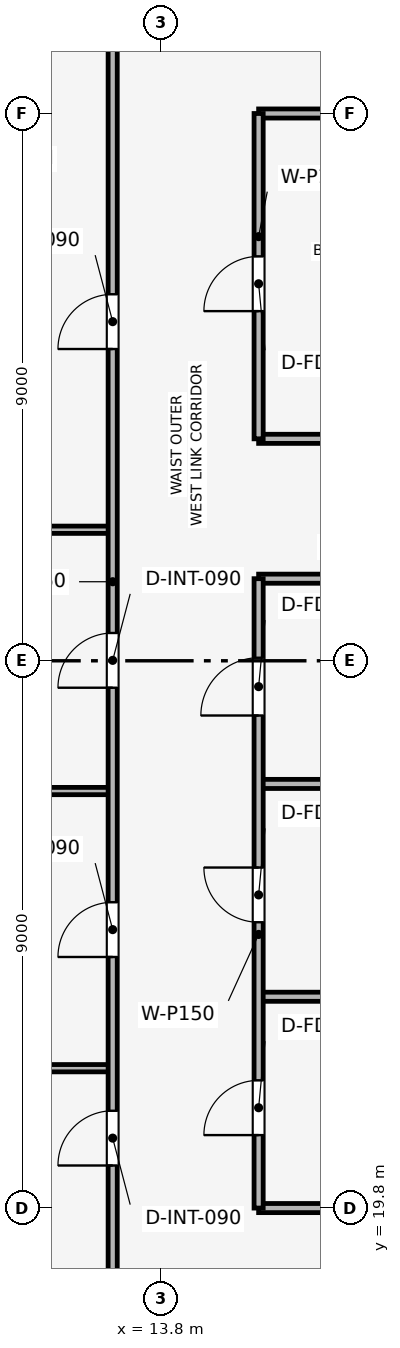
"""IFC4 building model, lengths in metres.
Left out: names, types, materials, properties, quantities, classifications, styles, units other than length and angle.
Written with IfcOpenShell. Run it as: python <this file> out.ifc"""

import sys

from ifc_helpers import new_model, si_unit, direction, frame, frame_2d, origin, place, context, subcontext, project, spatial, rectangle, extrude, element, fill, save


model = new_model("IFC4")
c1 = context("Model", 3, precision=1e-05, world=origin(), true_north=direction((0.0, 1.0)))
c2 = subcontext(c1, "Body", "Model", "MODEL_VIEW")
j1 = project(units=[si_unit("LENGTHUNIT", "METRE"), si_unit("PLANEANGLEUNIT", "RADIAN")], contexts=[c1])
p1 = place(None, origin())
s1 = spatial("IfcSite", under=j1, at=p1, CompositionType="ELEMENT")
p2 = place(p1, origin())
s2 = spatial("IfcBuilding", under=s1, at=p2, CompositionType="ELEMENT")
p3 = place(p2, frame((0.0, 0.0, 199.95)))
s3 = spatial("IfcBuildingStorey", under=s2, at=p3, CompositionType="ELEMENT", Elevation=199.95)
p4 = place(p3, frame((15.4, 19.8, 0.0), z_axis=(0.0, 0.0, 1.0), x_axis=(1.0, 0.0, 0.0)))
e1 = element("IfcWall", 1, at=p4, inside=s3, PredefinedType="PARTITIONING", context=c2, shape_type="SweptSolid", body=[
    extrude(rectangle(XDim=4.4, YDim=0.15, at=frame_2d((2.2, 0.0))), origin(), (0.0, 0.0, 1.0), 3.035),
])
for number, where, z_axis, x_axis in (
    (2, (15.4, 23.275, 0.0), (0.0, 0.0, 1.0), (1.0, 0.0, 0.0)),
    (3, (15.4, 26.775, 0.0), (0.0, 0.0, 1.0), (1.0, 0.0, 0.0)),
    (4, (15.4, 30.15, 0.0), (0.0, 0.0, 1.0), (1.0, 0.0, 0.0)),
    (5, (15.4, 32.45, 0.0), (0.0, 0.0, 1.0), (1.0, 0.0, 0.0)),
):
    element("IfcWall", number, at=place(p3, frame(where, z_axis=z_axis, x_axis=x_axis)), inside=s3, PredefinedType="PARTITIONING", context=c2, shape_type="SweptSolid", body=[
        extrude(rectangle(XDim=4.4, YDim=0.15, at=frame_2d((2.2, 0.0))), origin(), (0.0, 0.0, 1.0), 3.5),
    ])
p5 = place(p3, frame((15.4, 37.8, 0.0), z_axis=(0.0, 0.0, 1.0), x_axis=(1.0, 0.0, 0.0)))
e6 = element("IfcWall", 6, at=p5, inside=s3, PredefinedType="PARTITIONING", context=c2, shape_type="SweptSolid", body=[
    extrude(rectangle(XDim=4.4, YDim=0.15, at=frame_2d((2.2, 0.0))), origin(), (0.0, 0.0, 1.0), 3.035),
])
p6 = place(p3, frame((15.4, 19.8, 0.0), z_axis=(0.0, 0.0, 1.0), x_axis=(0.0, 1.0, 0.0)))
e7 = element("IfcWall", 7, at=p6, inside=s3, PredefinedType="PARTITIONING", context=c2, shape_type="SweptSolid", body=[
    extrude(rectangle(XDim=10.35, YDim=0.15, at=frame_2d((5.175, 0.0))), origin(), (0.0, 0.0, 1.0), 3.035),
])
p7 = place(p6, frame((1.2, 0.0, 0.0)))
e8 = element("IfcOpeningElement", 8, at=p7, cuts=e7, PredefinedType="OPENING", context=c2, shape_type="SweptSolid", body=[
    extrude(rectangle(XDim=0.9, YDim=2.1, at=frame_2d((0.45, 1.05))), frame((0.0, 0.085, 0.0), z_axis=(0.0, -1.0, 0.0), x_axis=(1.0, 0.0, 0.0)), (0.0, 0.0, 1.0), 0.17),
])
p8 = place(p6, frame((4.7, 0.0, 0.0)))
e9 = element("IfcOpeningElement", 9, at=p8, cuts=e7, PredefinedType="OPENING", context=c2, shape_type="SweptSolid", body=[
    extrude(rectangle(XDim=0.9, YDim=2.1, at=frame_2d((0.45, 1.05))), frame((0.0, 0.085, 0.0), z_axis=(0.0, -1.0, 0.0), x_axis=(1.0, 0.0, 0.0)), (0.0, 0.0, 1.0), 0.17),
])
p9 = place(p6, frame((8.1, 0.0, 0.0)))
e10 = element("IfcOpeningElement", 10, at=p9, cuts=e7, PredefinedType="OPENING", context=c2, shape_type="SweptSolid", body=[
    extrude(rectangle(XDim=0.95, YDim=2.1, at=frame_2d((0.475, 1.05))), frame((0.0, 0.085, 0.0), z_axis=(0.0, -1.0, 0.0), x_axis=(1.0, 0.0, 0.0)), (0.0, 0.0, 1.0), 0.17),
])
p10 = place(p3, frame((15.4, 32.45, 0.0), z_axis=(0.0, 0.0, 1.0), x_axis=(0.0, 1.0, 0.0)))
e11 = element("IfcWall", 11, at=p10, inside=s3, PredefinedType="PARTITIONING", context=c2, shape_type="SweptSolid", body=[
    extrude(rectangle(XDim=5.35, YDim=0.15, at=frame_2d((2.675, 0.0))), origin(), (0.0, 0.0, 1.0), 3.035),
])
p11 = place(p10, frame((2.1, 0.0, 0.0)))
e12 = element("IfcOpeningElement", 12, at=p11, cuts=e11, PredefinedType="OPENING", context=c2, shape_type="SweptSolid", body=[
    extrude(rectangle(XDim=0.9, YDim=2.1, at=frame_2d((0.45, 1.05))), frame((0.0, 0.085, 0.0), z_axis=(0.0, -1.0, 0.0), x_axis=(1.0, 0.0, 0.0)), (0.0, 0.0, 1.0), 0.17),
])
for number, where, z_axis, x_axis in (
    (13, (1.93, 22.1, 0.0), (0.0, 0.0, 1.0), (1.0, 0.0, 0.0)),
    (14, (1.93, 26.658, 0.0), (0.0, 0.0, 1.0), (1.0, 0.0, 0.0)),
    (15, (1.93, 30.955, 0.0), (0.0, 0.0, 1.0), (1.0, 0.0, 0.0)),
):
    element("IfcWall", number, at=place(p3, frame(where, z_axis=z_axis, x_axis=x_axis)), inside=s3, PredefinedType="PARTITIONING", context=c2, shape_type="SweptSolid", body=[
        extrude(rectangle(XDim=11.07, YDim=0.12, at=frame_2d((5.535, 0.0))), origin(), (0.0, 0.0, 1.0), 2.885),
    ])
p12 = place(p3, frame((13.0, 17.4, 0.0), z_axis=(0.0, 0.0, 1.0), x_axis=(0.0, 1.0, 0.0)))
e16 = element("IfcWall", 16, at=p12, inside=s3, PredefinedType="PARTITIONING", context=c2, shape_type="SweptSolid", body=[
    extrude(rectangle(XDim=22.8, YDim=0.15, at=frame_2d((11.4, 0.0))), origin(), (0.0, 0.0, 1.0), 3.035),
])
p13 = place(p12, frame((3.1, 0.0, 0.0)))
e17 = element("IfcOpeningElement", 17, at=p13, cuts=e16, PredefinedType="OPENING", context=c2, shape_type="SweptSolid", body=[
    extrude(rectangle(XDim=0.9, YDim=2.1, at=frame_2d((0.45, 1.05))), frame((0.0, 0.085, 0.0), z_axis=(0.0, -1.0, 0.0), x_axis=(1.0, 0.0, 0.0)), (0.0, 0.0, 1.0), 0.17),
])
p14 = place(p12, frame((6.529, 0.0, 0.0)))
e18 = element("IfcOpeningElement", 18, at=p14, cuts=e16, PredefinedType="OPENING", context=c2, shape_type="SweptSolid", body=[
    extrude(rectangle(XDim=0.9, YDim=2.1, at=frame_2d((0.45, 1.05))), frame((0.0, 0.085, 0.0), z_axis=(0.0, -1.0, 0.0), x_axis=(1.0, 0.0, 0.0)), (0.0, 0.0, 1.0), 0.17),
])
p15 = place(p12, frame((10.957, 0.0, 0.0)))
e19 = element("IfcOpeningElement", 19, at=p15, cuts=e16, PredefinedType="OPENING", context=c2, shape_type="SweptSolid", body=[
    extrude(rectangle(XDim=0.9, YDim=2.1, at=frame_2d((0.45, 1.05))), frame((0.0, 0.085, 0.0), z_axis=(0.0, -1.0, 0.0), x_axis=(1.0, 0.0, 0.0)), (0.0, 0.0, 1.0), 0.17),
])
p16 = place(p12, frame((16.527, 0.0, 0.0)))
e20 = element("IfcOpeningElement", 20, at=p16, cuts=e16, PredefinedType="OPENING", context=c2, shape_type="SweptSolid", body=[
    extrude(rectangle(XDim=0.9, YDim=2.1, at=frame_2d((0.45, 1.05))), frame((0.0, 0.085, 0.0), z_axis=(0.0, -1.0, 0.0), x_axis=(1.0, 0.0, 0.0)), (0.0, 0.0, 1.0), 0.17),
])
p17 = place(p7, origin())
e21 = element("IfcDoor", 21, at=p17, inside=s3, OperationType="SINGLE_SWING_LEFT", PredefinedType="DOOR", context=c2, shape_type="SweptSolid", body=[
    extrude(rectangle(XDim=0.9, YDim=2.1, at=frame_2d((0.45, 1.05))), frame((0.0, 0.025, 0.0), z_axis=(0.0, -1.0, 0.0), x_axis=(1.0, 0.0, 0.0)), (0.0, 0.0, 1.0), 0.05),
])
fill(e8, e21)
p18 = place(p8, origin())
e22 = element("IfcDoor", 22, at=p18, inside=s3, OperationType="SINGLE_SWING_RIGHT", PredefinedType="DOOR", context=c2, shape_type="SweptSolid", body=[
    extrude(rectangle(XDim=0.9, YDim=2.1, at=frame_2d((0.45, 1.05))), frame((0.0, 0.025, 0.0), z_axis=(0.0, -1.0, 0.0), x_axis=(1.0, 0.0, 0.0)), (0.0, 0.0, 1.0), 0.05),
])
fill(e9, e22)
p19 = place(p9, origin())
e23 = element("IfcDoor", 23, at=p19, inside=s3, OperationType="SINGLE_SWING_LEFT", PredefinedType="DOOR", context=c2, shape_type="SweptSolid", body=[
    extrude(rectangle(XDim=0.95, YDim=2.1, at=frame_2d((0.475, 1.05))), frame((0.0, 0.025, 0.0), z_axis=(0.0, -1.0, 0.0), x_axis=(1.0, 0.0, 0.0)), (0.0, 0.0, 1.0), 0.05),
])
fill(e10, e23)
p20 = place(p11, origin())
e24 = element("IfcDoor", 24, at=p20, inside=s3, OperationType="SINGLE_SWING_LEFT", PredefinedType="DOOR", context=c2, shape_type="SweptSolid", body=[
    extrude(rectangle(XDim=0.9, YDim=2.1, at=frame_2d((0.45, 1.05))), frame((0.0, 0.025, 0.0), z_axis=(0.0, -1.0, 0.0), x_axis=(1.0, 0.0, 0.0)), (0.0, 0.0, 1.0), 0.05),
])
fill(e12, e24)
p21 = place(p13, origin())
e25 = element("IfcDoor", 25, at=p21, inside=s3, OperationType="SINGLE_SWING_LEFT", PredefinedType="DOOR", context=c2, shape_type="SweptSolid", body=[
    extrude(rectangle(XDim=0.9, YDim=2.1, at=frame_2d((0.45, 1.05))), frame((0.0, 0.025, 0.0), z_axis=(0.0, -1.0, 0.0), x_axis=(1.0, 0.0, 0.0)), (0.0, 0.0, 1.0), 0.05),
])
fill(e17, e25)
p22 = place(p14, origin())
e26 = element("IfcDoor", 26, at=p22, inside=s3, OperationType="SINGLE_SWING_LEFT", PredefinedType="DOOR", context=c2, shape_type="SweptSolid", body=[
    extrude(rectangle(XDim=0.9, YDim=2.1, at=frame_2d((0.45, 1.05))), frame((0.0, 0.025, 0.0), z_axis=(0.0, -1.0, 0.0), x_axis=(1.0, 0.0, 0.0)), (0.0, 0.0, 1.0), 0.05),
])
fill(e18, e26)
p23 = place(p15, origin())
e27 = element("IfcDoor", 27, at=p23, inside=s3, OperationType="SINGLE_SWING_LEFT", PredefinedType="DOOR", context=c2, shape_type="SweptSolid", body=[
    extrude(rectangle(XDim=0.9, YDim=2.1, at=frame_2d((0.45, 1.05))), frame((0.0, 0.025, 0.0), z_axis=(0.0, -1.0, 0.0), x_axis=(1.0, 0.0, 0.0)), (0.0, 0.0, 1.0), 0.05),
])
fill(e19, e27)
p24 = place(p16, origin())
e28 = element("IfcDoor", 28, at=p24, inside=s3, OperationType="SINGLE_SWING_LEFT", PredefinedType="DOOR", context=c2, shape_type="SweptSolid", body=[
    extrude(rectangle(XDim=0.9, YDim=2.1, at=frame_2d((0.45, 1.05))), frame((0.0, 0.025, 0.0), z_axis=(0.0, -1.0, 0.0), x_axis=(1.0, 0.0, 0.0)), (0.0, 0.0, 1.0), 0.05),
])
fill(e20, e28)
save(model, sys.argv[1])
